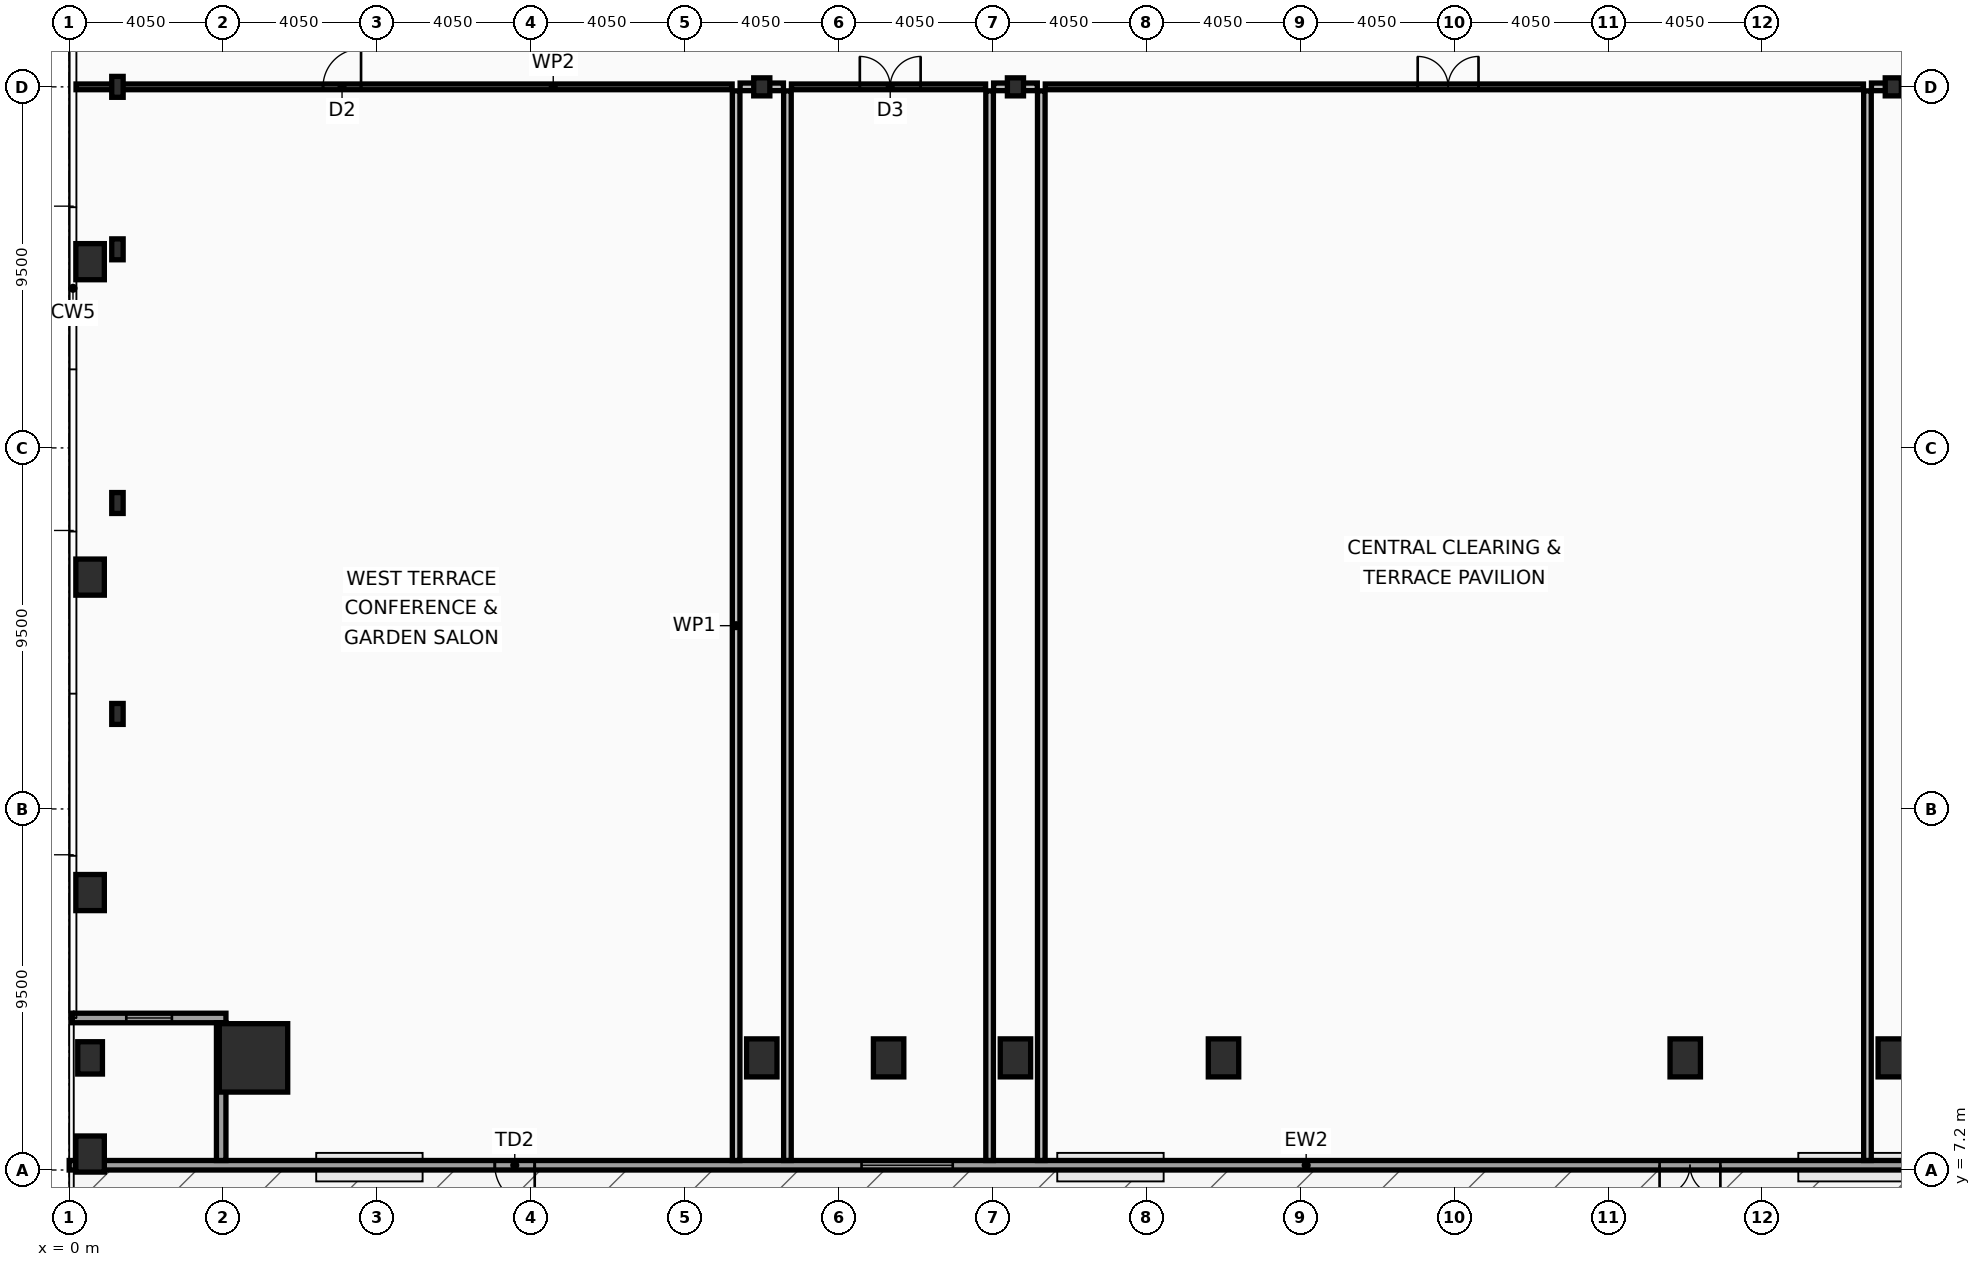
"""IFC4 building model, lengths in metres.
Left out: names, types, materials, properties, quantities, classifications, styles, units other than length and angle.
Written with IfcOpenShell. Run it as: python <this file> out.ifc"""

import sys

from ifc_helpers import new_model, si_unit, direction, frame, frame_2d, origin, origin_2d, place, context, subcontext, project, spatial, rectangle, hollow_rectangle, i_section, extrude, element, fill, save


model = new_model("IFC4")
c1 = context("Model", 3, precision=1e-05, world=origin(), true_north=direction((0.0, 1.0)))
c2 = subcontext(c1, "Body", "Model", "MODEL_VIEW")
j1 = project(units=[si_unit("LENGTHUNIT", "METRE"), si_unit("PLANEANGLEUNIT", "RADIAN")], contexts=[c1])
p1 = place(None, origin())
s1 = spatial("IfcSite", under=j1, at=p1, CompositionType="ELEMENT")
p2 = place(p1, origin())
s2 = spatial("IfcBuilding", under=s1, at=p2, CompositionType="ELEMENT")
p3 = place(p2, frame((0.0, 0.0, 20.4)))
s3 = spatial("IfcBuildingStorey", under=s2, at=p3, CompositionType="ELEMENT", Elevation=20.4)
p4 = place(p3, frame((4.85, 10.15, 0.0), z_axis=(0.0, 0.0, 1.0), x_axis=(1.0, 0.0, 0.0)))
e1 = element("IfcColumn", 1, at=p4, inside=s3, PredefinedType="COLUMN", context=c2, shape_type="SweptSolid", body=[
    extrude(hollow_rectangle(XDim=1.8, YDim=1.8, WallThickness=0.08, at=origin_2d()), origin(), (0.0, 0.0, 1.0), 5.4),
])
for number, where, z_axis, x_axis in (
    (2, (18.225, 10.15, 0.0), (0.0, 0.0, 1.0), (1.0, 0.0, 0.0)),
    (3, (21.562, 10.15, 0.0), (0.0, 0.0, 1.0), (1.0, 0.0, 0.0)),
    (4, (24.9, 10.15, 0.0), (0.0, 0.0, 1.0), (1.0, 0.0, 0.0)),
    (5, (30.375, 10.15, 0.0), (0.0, 0.0, 1.0), (1.0, 0.0, 0.0)),
    (6, (42.525, 10.15, 0.0), (0.0, 0.0, 1.0), (1.0, 0.0, 0.0)),
    (7, (48.0, 10.15, 0.0), (0.0, 0.0, 1.0), (1.0, 0.0, 0.0)),
):
    element("IfcColumn", number, at=place(p3, frame(where, z_axis=z_axis, x_axis=x_axis)), inside=s3, PredefinedType="COLUMN", context=c2, shape_type="SweptSolid", body=[
        extrude(hollow_rectangle(XDim=0.8, YDim=1.0, WallThickness=0.055, at=origin_2d()), origin(), (0.0, 0.0, 1.0), 5.4),
    ])
for number, where, z_axis, x_axis in (
    (8, (1.27, 19.2, 0.0), (0.0, 0.0, 1.0), (1.0, 0.0, 0.0)),
    (9, (1.27, 24.75, 0.0), (0.0, 0.0, 1.0), (1.0, 0.0, 0.0)),
    (10, (1.27, 31.425, 0.0), (0.0, 0.0, 1.0), (1.0, 0.0, 0.0)),
    (11, (1.27, 35.7, 0.0), (0.0, 0.0, 1.0), (1.0, 0.0, 0.0)),
):
    element("IfcColumn", number, at=place(p3, frame(where, z_axis=z_axis, x_axis=x_axis)), inside=s3, PredefinedType="COLUMN", context=c2, shape_type="SweptSolid", body=[
        extrude(i_section(OverallWidth=0.3, OverallDepth=0.55, WebThickness=0.015, FlangeThickness=0.029, at=origin_2d()), origin(), (0.0, 0.0, 1.0), 5.4),
    ])
for number, where, z_axis, x_axis in (
    (12, (18.225, 35.7, 0.0), (0.0, 0.0, 1.0), (1.0, 0.0, 0.0)),
    (13, (24.9, 35.7, 0.0), (0.0, 0.0, 1.0), (1.0, 0.0, 0.0)),
    (14, (48.0, 35.7, 0.0), (0.0, 0.0, 1.0), (1.0, 0.0, 0.0)),
):
    element("IfcColumn", number, at=place(p3, frame(where, z_axis=z_axis, x_axis=x_axis)), inside=s3, PredefinedType="COLUMN", context=c2, shape_type="SweptSolid", body=[
        extrude(i_section(OverallWidth=0.424, OverallDepth=0.474, WebThickness=0.048, FlangeThickness=0.077, at=origin_2d()), origin(), (0.0, 0.0, 1.0), 5.4),
    ])
p5 = place(p3, frame((0.55, 7.62, 0.0), z_axis=(0.0, 0.0, 1.0), x_axis=(1.0, 0.0, 0.0)))
e15 = element("IfcColumn", 15, at=p5, inside=s3, PredefinedType="PILASTER", context=c2, shape_type="SweptSolid", body=[
    extrude(rectangle(XDim=0.75, YDim=0.95, at=origin_2d()), origin(), (0.0, 0.0, 1.0), 5.4),
])
p6 = place(p3, frame((0.55, 10.15, 0.0), z_axis=(0.0, 0.0, 1.0), x_axis=(1.0, 0.0, 0.0)))
e16 = element("IfcColumn", 16, at=p6, inside=s3, PredefinedType="PILASTER", context=c2, shape_type="SweptSolid", body=[
    extrude(rectangle(XDim=0.65, YDim=0.85, at=origin_2d()), origin(), (0.0, 0.0, 1.0), 5.4),
])
for number, where, z_axis, x_axis in (
    (17, (0.55, 14.5, 0.0), (0.0, 0.0, 1.0), (1.0, 0.0, 0.0)),
    (18, (0.55, 22.8, 0.0), (0.0, 0.0, 1.0), (1.0, 0.0, 0.0)),
    (19, (0.55, 31.1, 0.0), (0.0, 0.0, 1.0), (1.0, 0.0, 0.0)),
):
    element("IfcColumn", number, at=place(p3, frame(where, z_axis=z_axis, x_axis=x_axis)), inside=s3, PredefinedType="PILASTER", context=c2, shape_type="SweptSolid", body=[
        extrude(rectangle(XDim=0.75, YDim=0.95, at=origin_2d()), origin(), (0.0, 0.0, 1.0), 5.4),
    ])
p7 = place(p3, frame((72.9, 7.325, 0.0), z_axis=(0.0, 0.0, 1.0), x_axis=(-1.0, 0.0, 0.0)))
e20 = element("IfcWall", 20, at=p7, inside=s3, PredefinedType="SOLIDWALL", context=c2, shape_type="SweptSolid", body=[
    extrude(rectangle(XDim=72.9, YDim=0.25, at=frame_2d((36.45, 0.0))), origin(), (0.0, 0.0, 1.0), 4.56),
])
p8 = place(p7, frame((10.45, 0.0, 0.0)))
e21 = element("IfcOpeningElement", 21, at=p8, cuts=e20, PredefinedType="OPENING", context=c2, shape_type="SweptSolid", body=[
    extrude(rectangle(XDim=1.6, YDim=2.2, at=frame_2d((0.8, 1.1))), frame((0.0, 0.135, 0.0), z_axis=(0.0, -1.0, 0.0), x_axis=(1.0, 0.0, 0.0)), (0.0, 0.0, 1.0), 0.27),
])
p9 = place(p7, frame((29.45, 0.0, 0.0)))
e22 = element("IfcOpeningElement", 22, at=p9, cuts=e20, PredefinedType="OPENING", context=c2, shape_type="SweptSolid", body=[
    extrude(rectangle(XDim=1.6, YDim=2.2, at=frame_2d((0.8, 1.1))), frame((0.0, 0.135, 0.0), z_axis=(0.0, -1.0, 0.0), x_axis=(1.0, 0.0, 0.0)), (0.0, 0.0, 1.0), 0.27),
])
p10 = place(p7, frame((60.65, 0.0, 0.0)))
e23 = element("IfcOpeningElement", 23, at=p10, cuts=e20, PredefinedType="OPENING", context=c2, shape_type="SweptSolid", body=[
    extrude(rectangle(XDim=1.05, YDim=2.15, at=frame_2d((0.525, 1.075))), frame((0.0, 0.135, 0.0), z_axis=(0.0, -1.0, 0.0), x_axis=(1.0, 0.0, 0.0)), (0.0, 0.0, 1.0), 0.27),
])
p11 = place(p7, frame((21.05, 0.0, 0.85)))
e24 = element("IfcOpeningElement", 24, at=p11, cuts=e20, PredefinedType="OPENING", context=c2, shape_type="SweptSolid", body=[
    extrude(rectangle(XDim=2.4, YDim=2.6, at=frame_2d((1.2, 1.3))), frame((0.0, 0.135, 0.0), z_axis=(0.0, -1.0, 0.0), x_axis=(1.0, 0.0, 0.0)), (0.0, 0.0, 1.0), 0.27),
])
p12 = place(p7, frame((49.65, 0.0, 0.85)))
e25 = element("IfcOpeningElement", 25, at=p12, cuts=e20, PredefinedType="OPENING", context=c2, shape_type="SweptSolid", body=[
    extrude(rectangle(XDim=2.4, YDim=2.6, at=frame_2d((1.2, 1.3))), frame((0.0, 0.135, 0.0), z_axis=(0.0, -1.0, 0.0), x_axis=(1.0, 0.0, 0.0)), (0.0, 0.0, 1.0), 0.27),
])
p13 = place(p3, frame((4.125, 11.2, 0.0), z_axis=(0.0, 0.0, 1.0), x_axis=(-1.0, 0.0, 0.0)))
e26 = element("IfcWall", 26, at=p13, inside=s3, PredefinedType="SOLIDWALL", context=c2, shape_type="SweptSolid", body=[
    extrude(rectangle(XDim=4.045, YDim=0.25, at=frame_2d((2.022, 0.0))), origin(), (0.0, 0.0, 1.0), 3.76),
])
p14 = place(p13, frame((1.423, 0.0, 0.9)))
e27 = element("IfcOpeningElement", 27, at=p14, cuts=e26, PredefinedType="OPENING", context=c2, shape_type="SweptSolid", body=[
    extrude(rectangle(XDim=1.2, YDim=2.8, at=frame_2d((0.6, 1.4))), frame((0.0, 0.135, 0.0), z_axis=(0.0, -1.0, 0.0), x_axis=(1.0, 0.0, 0.0)), (0.0, 0.0, 1.0), 0.27),
])
p15 = place(p3, frame((4.0, 7.45, 0.0), z_axis=(0.0, 0.0, 1.0), x_axis=(0.0, 1.0, 0.0)))
e28 = element("IfcWall", 28, at=p15, inside=s3, PredefinedType="SOLIDWALL", context=c2, shape_type="SweptSolid", body=[
    extrude(rectangle(XDim=3.625, YDim=0.25, at=frame_2d((1.812, 0.0))), origin(), (0.0, 0.0, 1.0), 3.76),
])
p16 = place(p3, frame((0.18, 35.7, 0.0), z_axis=(0.0, 0.0, 1.0), x_axis=(1.0, 0.0, 0.0)))
e29 = element("IfcWall", 29, at=p16, inside=s3, PredefinedType="PARTITIONING", context=c2, shape_type="SweptSolid", body=[
    extrude(rectangle(XDim=17.265, YDim=0.15, at=frame_2d((8.633, 0.0))), origin(), (0.0, 0.0, 1.0), 4.41),
])
p17 = place(p16, frame((6.5, 0.0, 0.0)))
e30 = element("IfcOpeningElement", 30, at=p17, cuts=e29, PredefinedType="OPENING", context=c2, shape_type="SweptSolid", body=[
    extrude(rectangle(XDim=1.0, YDim=2.05, at=frame_2d((0.5, 1.025))), frame((0.0, 0.085, 0.0), z_axis=(0.0, -1.0, 0.0), x_axis=(1.0, 0.0, 0.0)), (0.0, 0.0, 1.0), 0.17),
])
p18 = place(p3, frame((17.655, 35.7, 0.0), z_axis=(0.0, 0.0, 1.0), x_axis=(1.0, 0.0, 0.0)))
e31 = element("IfcWall", 31, at=p18, inside=s3, PredefinedType="PARTITIONING", context=c2, shape_type="SweptSolid", body=[
    extrude(rectangle(XDim=1.14, YDim=0.2, at=frame_2d((0.57, 0.0))), origin(), (0.0, 0.0, 1.0), 2.21),
])
p19 = place(p3, frame((19.005, 35.7, 0.0), z_axis=(0.0, 0.0, 1.0), x_axis=(1.0, 0.0, 0.0)))
e32 = element("IfcWall", 32, at=p19, inside=s3, PredefinedType="PARTITIONING", context=c2, shape_type="SweptSolid", body=[
    extrude(rectangle(XDim=5.11, YDim=0.15, at=frame_2d((2.555, 0.0))), origin(), (0.0, 0.0, 1.0), 4.61),
])
p20 = place(p19, frame((1.8, 0.0, 0.0)))
e33 = element("IfcOpeningElement", 33, at=p20, cuts=e32, PredefinedType="OPENING", context=c2, shape_type="SweptSolid", body=[
    extrude(rectangle(XDim=1.6, YDim=2.15, at=frame_2d((0.8, 1.075))), frame((0.0, 0.085, 0.0), z_axis=(0.0, -1.0, 0.0), x_axis=(1.0, 0.0, 0.0)), (0.0, 0.0, 1.0), 0.17),
])
p21 = place(p3, frame((24.325, 35.7, 0.0), z_axis=(0.0, 0.0, 1.0), x_axis=(1.0, 0.0, 0.0)))
e34 = element("IfcWall", 34, at=p21, inside=s3, PredefinedType="PARTITIONING", context=c2, shape_type="SweptSolid", body=[
    extrude(rectangle(XDim=1.15, YDim=0.2, at=frame_2d((0.575, 0.0))), origin(), (0.0, 0.0, 1.0), 2.21),
])
p22 = place(p3, frame((25.685, 35.7, 0.0), z_axis=(0.0, 0.0, 1.0), x_axis=(1.0, 0.0, 0.0)))
e35 = element("IfcWall", 35, at=p22, inside=s3, PredefinedType="PARTITIONING", context=c2, shape_type="SweptSolid", body=[
    extrude(rectangle(XDim=21.53, YDim=0.15, at=frame_2d((10.765, 0.0))), origin(), (0.0, 0.0, 1.0), 4.41),
])
p23 = place(p22, frame((9.8, 0.0, 0.0)))
e36 = element("IfcOpeningElement", 36, at=p23, cuts=e35, PredefinedType="OPENING", context=c2, shape_type="SweptSolid", body=[
    extrude(rectangle(XDim=1.6, YDim=2.15, at=frame_2d((0.8, 1.075))), frame((0.0, 0.085, 0.0), z_axis=(0.0, -1.0, 0.0), x_axis=(1.0, 0.0, 0.0)), (0.0, 0.0, 1.0), 0.17),
])
p24 = place(p3, frame((47.425, 35.7, 0.0), z_axis=(0.0, 0.0, 1.0), x_axis=(1.0, 0.0, 0.0)))
e37 = element("IfcWall", 37, at=p24, inside=s3, PredefinedType="PARTITIONING", context=c2, shape_type="SweptSolid", body=[
    extrude(rectangle(XDim=1.15, YDim=0.2, at=frame_2d((0.575, 0.0))), origin(), (0.0, 0.0, 1.0), 2.21),
])
p25 = place(p3, frame((17.55, 7.45, 0.0), z_axis=(0.0, 0.0, 1.0), x_axis=(0.0, 1.0, 0.0)))
e38 = element("IfcWall", 38, at=p25, inside=s3, PredefinedType="PARTITIONING", context=c2, shape_type="SweptSolid", body=[
    extrude(rectangle(XDim=28.145, YDim=0.2, at=frame_2d((14.073, 0.0))), origin(), (0.0, 0.0, 1.0), 3.89),
])
for number, where, z_axis, x_axis in (
    (39, (18.9, 7.45, 0.0), (0.0, 0.0, 1.0), (0.0, 1.0, 0.0)),
    (40, (24.22, 7.45, 0.0), (0.0, 0.0, 1.0), (0.0, 1.0, 0.0)),
    (41, (25.58, 7.45, 0.0), (0.0, 0.0, 1.0), (0.0, 1.0, 0.0)),
    (42, (47.32, 7.45, 0.0), (0.0, 0.0, 1.0), (0.0, 1.0, 0.0)),
):
    element("IfcWall", number, at=place(p3, frame(where, z_axis=z_axis, x_axis=x_axis)), inside=s3, PredefinedType="PARTITIONING", context=c2, shape_type="SweptSolid", body=[
        extrude(rectangle(XDim=28.145, YDim=0.2, at=frame_2d((14.073, 0.0))), origin(), (0.0, 0.0, 1.0), 4.56),
    ])
p26 = place(p9, origin())
e43 = element("IfcDoor", 43, at=p26, inside=s3, OperationType="DOUBLE_DOOR_SINGLE_SWING", PredefinedType="DOOR", context=c2, shape_type="SweptSolid", body=[
    extrude(rectangle(XDim=1.6, YDim=2.2, at=frame_2d((0.8, 1.1))), frame((0.0, 0.025, 0.0), z_axis=(0.0, -1.0, 0.0), x_axis=(1.0, 0.0, 0.0)), (0.0, 0.0, 1.0), 0.05),
])
fill(e22, e43)
p27 = place(p10, origin())
e44 = element("IfcDoor", 44, at=p27, inside=s3, OperationType="SINGLE_SWING_LEFT", PredefinedType="DOOR", context=c2, shape_type="SweptSolid", body=[
    extrude(rectangle(XDim=1.05, YDim=2.15, at=frame_2d((0.525, 1.075))), frame((0.0, 0.025, 0.0), z_axis=(0.0, -1.0, 0.0), x_axis=(1.0, 0.0, 0.0)), (0.0, 0.0, 1.0), 0.05),
])
fill(e23, e44)
p28 = place(p12, origin())
e45 = element("IfcWindow", 45, at=p28, inside=s3, PartitioningType="SINGLE_PANEL", PredefinedType="WINDOW", context=c2, shape_type="SweptSolid", body=[
    extrude(rectangle(XDim=2.4, YDim=2.6, at=frame_2d((1.2, 1.3))), frame((0.0, 0.03, 0.0), z_axis=(0.0, -1.0, 0.0), x_axis=(1.0, 0.0, 0.0)), (0.0, 0.0, 1.0), 0.06),
])
fill(e25, e45)
p29 = place(p14, origin())
e46 = element("IfcWindow", 46, at=p29, inside=s3, PartitioningType="SINGLE_PANEL", PredefinedType="WINDOW", context=c2, shape_type="SweptSolid", body=[
    extrude(rectangle(XDim=1.2, YDim=2.8, at=frame_2d((0.6, 1.4))), frame((0.0, 0.03, 0.0), z_axis=(0.0, -1.0, 0.0), x_axis=(1.0, 0.0, 0.0)), (0.0, 0.0, 1.0), 0.06),
])
fill(e27, e46)
p30 = place(p17, origin())
e47 = element("IfcDoor", 47, at=p30, inside=s3, OperationType="SINGLE_SWING_RIGHT", PredefinedType="DOOR", context=c2, shape_type="SweptSolid", body=[
    extrude(rectangle(XDim=1.0, YDim=2.05, at=frame_2d((0.5, 1.025))), frame((0.0, 0.025, 0.0), z_axis=(0.0, -1.0, 0.0), x_axis=(1.0, 0.0, 0.0)), (0.0, 0.0, 1.0), 0.05),
])
fill(e30, e47)
p31 = place(p20, origin())
e48 = element("IfcDoor", 48, at=p31, inside=s3, OperationType="DOUBLE_DOOR_SINGLE_SWING", PredefinedType="DOOR", context=c2, shape_type="SweptSolid", body=[
    extrude(rectangle(XDim=1.6, YDim=2.15, at=frame_2d((0.8, 1.075))), frame((0.0, 0.025, 0.0), z_axis=(0.0, -1.0, 0.0), x_axis=(1.0, 0.0, 0.0)), (0.0, 0.0, 1.0), 0.05),
])
fill(e33, e48)
p32 = place(p23, origin())
e49 = element("IfcDoor", 49, at=p32, inside=s3, OperationType="DOUBLE_DOOR_SINGLE_SWING", PredefinedType="DOOR", context=c2, shape_type="SweptSolid", body=[
    extrude(rectangle(XDim=1.6, YDim=2.15, at=frame_2d((0.8, 1.075))), frame((0.0, 0.025, 0.0), z_axis=(0.0, -1.0, 0.0), x_axis=(1.0, 0.0, 0.0)), (0.0, 0.0, 1.0), 0.05),
])
fill(e36, e49)
save(model, sys.argv[1])
